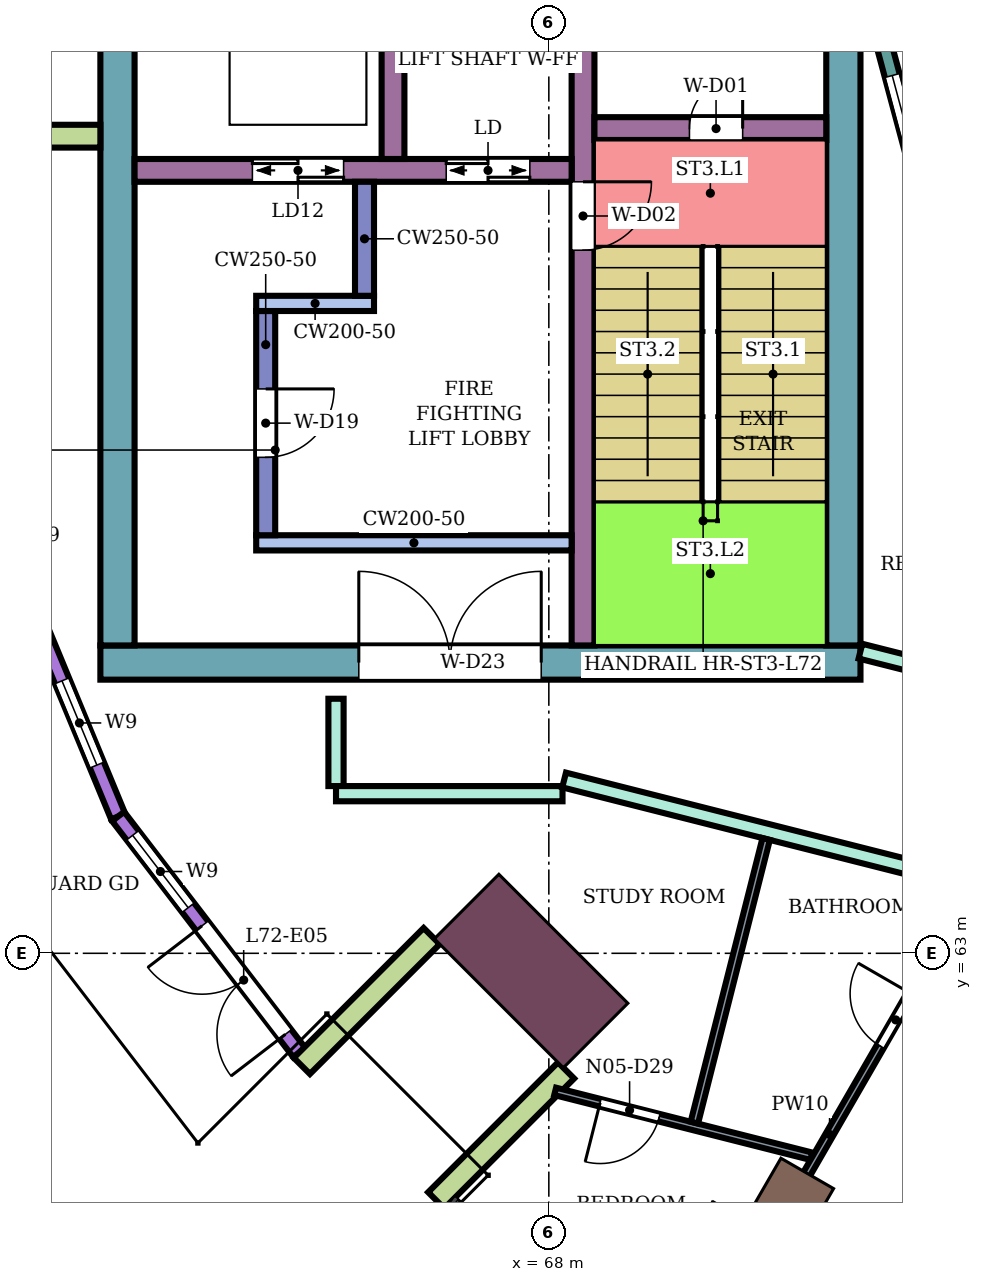
"""IFC4 building model, lengths in metres.
Left out: names, types, materials, properties, quantities, classifications, styles, units other than length and angle.
Written with IfcOpenShell. Run it as: python <this file> out.ifc"""

import sys

from ifc_helpers import new_model, si_unit, direction, frame, frame_2d, origin, origin_2d, place, context, subcontext, project, spatial, rectangle, extrude, element, fill, save


model = new_model("IFC4")
c1 = context("Model", 3, precision=1e-05, world=origin(), true_north=direction((0.0, 1.0)))
c2 = subcontext(c1, "Body", "Model", "MODEL_VIEW")
j1 = project(units=[si_unit("LENGTHUNIT", "METRE"), si_unit("PLANEANGLEUNIT", "RADIAN")], contexts=[c1])
p1 = place(None, origin())
s1 = spatial("IfcSite", under=j1, at=p1, CompositionType="ELEMENT")
p2 = place(p1, origin())
s2 = spatial("IfcBuilding", under=s1, at=p2, CompositionType="ELEMENT")
p3 = place(p2, frame((0.0, 0.0, 314.9)))
s3 = spatial("IfcBuildingStorey", under=s2, at=p3, CompositionType="ELEMENT", Elevation=314.9)
p4 = place(p3, frame((71.2, 59.758, 0.0), z_axis=(0.0, 0.0, 1.0), x_axis=(-0.5, -0.866025403784, 0.0)))
e1 = element("IfcColumn", 1, at=p4, inside=s3, PredefinedType="COLUMN", context=c2, shape_type="SweptSolid", body=[
    extrude(rectangle(XDim=0.8, YDim=0.8, at=origin_2d()), origin(), (0.0, 0.0, 1.0), 4.4),
])
p5 = place(p3, frame((67.767, 62.767, 0.0), z_axis=(0.0, 0.0, 1.0), x_axis=(-0.707106781187, -0.707106781187, 0.0)))
e2 = element("IfcColumn", 2, at=p5, inside=s3, PredefinedType="COLUMN", context=c2, shape_type="SweptSolid", body=[
    extrude(rectangle(XDim=1.2, YDim=2.4, at=origin_2d()), origin(), (0.0, 0.0, 1.0), 4.4),
])
p6 = place(p3, frame((72.1, 66.825, 0.0), z_axis=(0.0, 0.0, 1.0), x_axis=(-1.0, 0.0, 0.0)))
e3 = element("IfcWall", 3, at=p6, inside=s3, PredefinedType="SHEAR", context=c2, shape_type="SweptSolid", body=[
    extrude(rectangle(XDim=10.0, YDim=0.45, at=frame_2d((5.0, 0.0))), origin(), (0.0, 0.0, 1.0), 4.08),
])
p7 = place(p6, frame((4.2, 0.0, 0.0)))
e4 = element("IfcOpeningElement", 4, at=p7, cuts=e3, PredefinedType="OPENING", context=c2, shape_type="SweptSolid", body=[
    extrude(rectangle(XDim=2.4, YDim=2.4, at=frame_2d((1.2, 1.2))), frame((0.0, 0.235, 0.0), z_axis=(0.0, -1.0, 0.0), x_axis=(1.0, 0.0, 0.0)), (0.0, 0.0, 1.0), 0.47),
])
p8 = place(p3, frame((71.875, 75.0, 0.0), z_axis=(0.0, 0.0, 1.0), x_axis=(0.0, -1.0, 0.0)))
e5 = element("IfcWall", 5, at=p8, inside=s3, PredefinedType="SHEAR", context=c2, shape_type="SweptSolid", body=[
    extrude(rectangle(XDim=7.95, YDim=0.45, at=frame_2d((3.975, 0.0))), origin(), (0.0, 0.0, 1.0), 4.08),
])
p9 = place(p3, frame((62.325, 76.4, 0.0), z_axis=(0.0, 0.0, 1.0), x_axis=(0.0, -1.0, 0.0)))
e6 = element("IfcWall", 6, at=p9, inside=s3, PredefinedType="SHEAR", context=c2, shape_type="SweptSolid", body=[
    extrude(rectangle(XDim=9.35, YDim=0.45, at=frame_2d((4.675, 0.0))), origin(), (0.0, 0.0, 1.0), 4.08),
])
p10 = place(p3, frame((68.45, 75.0, 0.0), z_axis=(0.0, 0.0, 1.0), x_axis=(0.0, -1.0, 0.0)))
e7 = element("IfcWall", 7, at=p10, inside=s3, PredefinedType="SHEAR", context=c2, shape_type="SweptSolid", body=[
    extrude(rectangle(XDim=7.95, YDim=0.3, at=frame_2d((3.975, 0.0))), origin(), (0.0, 0.0, 1.0), 4.08),
])
p11 = place(p10, frame((1.85, 0.0, 0.0)))
e8 = element("IfcOpeningElement", 8, at=p11, cuts=e7, PredefinedType="OPENING", context=c2, shape_type="SweptSolid", body=[
    extrude(rectangle(XDim=0.9, YDim=2.1, at=frame_2d((0.45, 1.05))), frame((0.0, 0.16, 0.0), z_axis=(0.0, -1.0, 0.0), x_axis=(1.0, 0.0, 0.0)), (0.0, 0.0, 1.0), 0.32),
])
p12 = place(p3, frame((71.65, 73.85, 0.0), z_axis=(0.0, 0.0, 1.0), x_axis=(-1.0, 0.0, 0.0)))
e9 = element("IfcWall", 9, at=p12, inside=s3, PredefinedType="SHEAR", context=c2, shape_type="SweptSolid", body=[
    extrude(rectangle(XDim=3.05, YDim=0.3, at=frame_2d((1.525, 0.0))), origin(), (0.0, 0.0, 1.0), 4.08),
])
p13 = place(p12, frame((1.1, 0.0, 0.0)))
e10 = element("IfcOpeningElement", 10, at=p13, cuts=e9, PredefinedType="OPENING", context=c2, shape_type="SweptSolid", body=[
    extrude(rectangle(XDim=0.7, YDim=2.0, at=frame_2d((0.35, 1.0))), frame((0.0, 0.16, 0.0), z_axis=(0.0, -1.0, 0.0), x_axis=(1.0, 0.0, 0.0)), (0.0, 0.0, 1.0), 0.32),
])
p14 = place(p3, frame((68.3, 73.3, 0.0), z_axis=(0.0, 0.0, 1.0), x_axis=(-1.0, 0.0, 0.0)))
e11 = element("IfcWall", 11, at=p14, inside=s3, PredefinedType="SHEAR", context=c2, shape_type="SweptSolid", body=[
    extrude(rectangle(XDim=5.75, YDim=0.3, at=frame_2d((2.875, 0.0))), origin(), (0.0, 0.0, 1.0), 4.08),
])
p15 = place(p14, frame((0.55, 0.0, 0.0)))
e12 = element("IfcOpeningElement", 12, at=p15, cuts=e11, PredefinedType="OPENING", context=c2, shape_type="SweptSolid", body=[
    extrude(rectangle(XDim=1.1, YDim=2.1, at=frame_2d((0.55, 1.05))), frame((0.0, 0.16, 0.0), z_axis=(0.0, -1.0, 0.0), x_axis=(1.0, 0.0, 0.0)), (0.0, 0.0, 1.0), 0.32),
])
p16 = place(p14, frame((3.0, 0.0, 0.0)))
e13 = element("IfcOpeningElement", 13, at=p16, cuts=e11, PredefinedType="OPENING", context=c2, shape_type="SweptSolid", body=[
    extrude(rectangle(XDim=1.2, YDim=2.1, at=frame_2d((0.6, 1.05))), frame((0.0, 0.16, 0.0), z_axis=(0.0, -1.0, 0.0), x_axis=(1.0, 0.0, 0.0)), (0.0, 0.0, 1.0), 0.32),
])
p17 = place(p3, frame((65.95, 76.0, 0.0), z_axis=(0.0, 0.0, 1.0), x_axis=(0.0, -1.0, 0.0)))
e14 = element("IfcWall", 14, at=p17, inside=s3, PredefinedType="SHEAR", context=c2, shape_type="SweptSolid", body=[
    extrude(rectangle(XDim=2.55, YDim=0.3, at=frame_2d((1.275, 0.0))), origin(), (0.0, 0.0, 1.0), 4.08),
])
p18 = place(p3, frame((68.3, 68.4, 0.0), z_axis=(0.0, 0.0, 1.0), x_axis=(-1.0, 0.0, 0.0)))
e15 = element("IfcWall", 15, at=p18, inside=s3, PredefinedType="SHEAR", context=c2, shape_type="SweptSolid", body=[
    extrude(rectangle(XDim=4.15, YDim=0.2, at=frame_2d((2.075, 0.0))), origin(), (0.0, 0.0, 1.0), 4.08),
])
p19 = place(p3, frame((64.275, 71.45, 0.0), z_axis=(0.0, 0.0, 1.0), x_axis=(0.0, -1.0, 0.0)))
e16 = element("IfcWall", 16, at=p19, inside=s3, PredefinedType="SHEAR", context=c2, shape_type="SweptSolid", body=[
    extrude(rectangle(XDim=2.95, YDim=0.25, at=frame_2d((1.475, 0.0))), origin(), (0.0, 0.0, 1.0), 4.08),
])
p20 = place(p19, frame((1.025, 0.0, 0.0)))
e17 = element("IfcOpeningElement", 17, at=p20, cuts=e16, PredefinedType="OPENING", context=c2, shape_type="SweptSolid", body=[
    extrude(rectangle(XDim=0.9, YDim=2.1, at=frame_2d((0.45, 1.05))), frame((0.0, 0.135, 0.0), z_axis=(0.0, -1.0, 0.0), x_axis=(1.0, 0.0, 0.0)), (0.0, 0.0, 1.0), 0.27),
])
p21 = place(p3, frame((65.7, 71.55, 0.0), z_axis=(0.0, 0.0, 1.0), x_axis=(-1.0, 0.0, 0.0)))
e18 = element("IfcWall", 18, at=p21, inside=s3, PredefinedType="SHEAR", context=c2, shape_type="SweptSolid", body=[
    extrude(rectangle(XDim=1.55, YDim=0.2, at=frame_2d((0.775, 0.0))), origin(), (0.0, 0.0, 1.0), 4.08),
])
p22 = place(p3, frame((65.575, 73.15, 0.0), z_axis=(0.0, 0.0, 1.0), x_axis=(0.0, -1.0, 0.0)))
e19 = element("IfcWall", 19, at=p22, inside=s3, PredefinedType="SHEAR", context=c2, shape_type="SweptSolid", body=[
    extrude(rectangle(XDim=1.5, YDim=0.25, at=frame_2d((0.75, 0.0))), origin(), (0.0, 0.0, 1.0), 4.08),
])
p23 = place(p3, frame((60.296, 69.72, 0.0), z_axis=(0.0, 0.0, 1.0), x_axis=(0.382690574388, -0.923876574156, 0.0)))
e20 = element("IfcWall", 20, at=p23, inside=s3, PredefinedType="NOTDEFINED", context=c2, shape_type="SweptSolid", body=[
    extrude(rectangle(XDim=5.325, YDim=0.2, at=frame_2d((2.663, 0.0))), origin(), (0.0, 0.0, 1.0), 4.4),
])
p24 = place(p23, frame((0.731, 0.0, 0.9)))
e21 = element("IfcOpeningElement", 21, at=p24, cuts=e20, PredefinedType="OPENING", context=c2, shape_type="SweptSolid", body=[
    extrude(rectangle(XDim=1.2, YDim=2.7, at=frame_2d((0.6, 1.35))), frame((0.0, 0.11, 0.0), z_axis=(0.0, -1.0, 0.0), x_axis=(1.0, 0.0, 0.0)), (0.0, 0.0, 1.0), 0.22),
])
p25 = place(p23, frame((3.394, 0.0, 0.9)))
e22 = element("IfcOpeningElement", 22, at=p25, cuts=e20, PredefinedType="OPENING", context=c2, shape_type="SweptSolid", body=[
    extrude(rectangle(XDim=1.2, YDim=2.7, at=frame_2d((0.6, 1.35))), frame((0.0, 0.11, 0.0), z_axis=(0.0, -1.0, 0.0), x_axis=(1.0, 0.0, 0.0)), (0.0, 0.0, 1.0), 0.22),
])
p26 = place(p3, frame((62.334, 64.801, 0.0), z_axis=(0.0, 0.0, 1.0), x_axis=(0.608757608177, -0.793356272104, 0.0)))
e23 = element("IfcWall", 23, at=p26, inside=s3, PredefinedType="NOTDEFINED", context=c2, shape_type="SweptSolid", body=[
    extrude(rectangle(XDim=3.913, YDim=0.2, at=frame_2d((1.957, 0.0))), origin(), (0.0, 0.0, 1.0), 4.4),
])
p27 = place(p26, frame((0.313, 0.0, 0.9)))
e24 = element("IfcOpeningElement", 24, at=p27, cuts=e23, PredefinedType="OPENING", context=c2, shape_type="SweptSolid", body=[
    extrude(rectangle(XDim=1.2, YDim=2.7, at=frame_2d((0.6, 1.35))), frame((0.0, 0.11, 0.0), z_axis=(0.0, -1.0, 0.0), x_axis=(1.0, 0.0, 0.0)), (0.0, 0.0, 1.0), 0.22),
])
p28 = place(p26, frame((1.813, 0.0, 0.0)))
e25 = element("IfcOpeningElement", 25, at=p28, cuts=e23, PredefinedType="OPENING", context=c2, shape_type="SweptSolid", body=[
    extrude(rectangle(XDim=1.8, YDim=2.7, at=frame_2d((0.9, 1.35))), frame((0.0, 0.11, 0.0), z_axis=(0.0, -1.0, 0.0), x_axis=(1.0, 0.0, 0.0)), (0.0, 0.0, 1.0), 0.22),
])
for number, where, z_axis, x_axis in (
    (26, (62.1, 73.75, 0.0), (0.0, 0.0, 1.0), (-1.0, 0.0, 0.0)),
    (27, (66.459, 63.227, 0.0), (0.0, 0.0, 1.0), (-0.707, -0.707, 0.0)),
    (28, (68.227, 61.459, 0.0), (0.0, 0.0, 1.0), (-0.707, -0.707, 0.0)),
):
    element("IfcWall", number, at=place(p3, frame(where, z_axis=z_axis, x_axis=x_axis)), inside=s3, PredefinedType="NOTDEFINED", context=c2, shape_type="SweptSolid", body=[
        extrude(rectangle(XDim=2.416, YDim=0.3, at=frame_2d((1.208, 0.0))), origin(), (0.0, 0.0, 1.0), 4.4),
    ])
p29 = place(p3, frame((72.396, 75.0, 0.0), z_axis=(0.0, 0.0, 1.0), x_axis=(0.258789828301, -0.965933654434, 0.0)))
e29 = element("IfcWall", 29, at=p29, inside=s3, PredefinedType="NOTDEFINED", context=c2, shape_type="SweptSolid", body=[
    extrude(rectangle(XDim=3.936, YDim=0.2, at=frame_2d((1.968, 0.0))), origin(), (0.0, 0.0, 1.0), 4.4),
])
p30 = place(p29, frame((0.468, 0.0, 0.9)))
e30 = element("IfcOpeningElement", 30, at=p30, cuts=e29, PredefinedType="OPENING", context=c2, shape_type="SweptSolid", body=[
    extrude(rectangle(XDim=3.0, YDim=2.3, at=frame_2d((1.5, 1.15))), frame((0.0, 0.11, 0.0), z_axis=(0.0, -1.0, 0.0), x_axis=(1.0, 0.0, 0.0)), (0.0, 0.0, 1.0), 0.22),
])
p31 = place(p3, frame((65.2, 65.2, 0.0), z_axis=(0.0, 0.0, 1.0), x_axis=(0.0, 1.0, 0.0)))
e31 = element("IfcWall", 31, at=p31, inside=s3, PredefinedType="PARTITIONING", context=c2, shape_type="SweptSolid", body=[
    extrude(rectangle(XDim=1.149, YDim=0.2, at=frame_2d((0.575, 0.0))), origin(), (0.0, 0.0, 1.0), 3.95),
])
p32 = place(p3, frame((65.2, 65.1, 0.0), z_axis=(0.0, 0.0, 1.0), x_axis=(1.0, 0.0, 0.0)))
e32 = element("IfcWall", 32, at=p32, inside=s3, PredefinedType="PARTITIONING", context=c2, shape_type="SweptSolid", body=[
    extrude(rectangle(XDim=2.98, YDim=0.2, at=frame_2d((1.49, 0.0))), origin(), (0.0, 0.0, 1.0), 3.95),
])
p33 = place(p3, frame((68.201, 65.28, 0.0), z_axis=(0.0, 0.0, 1.0), x_axis=(0.969421088032, -0.245403247897, 0.0)))
e33 = element("IfcWall", 33, at=p33, inside=s3, PredefinedType="PARTITIONING", context=c2, shape_type="SweptSolid", body=[
    extrude(rectangle(XDim=5.927, YDim=0.2, at=frame_2d((2.964, 0.0))), origin(), (0.0, 0.0, 1.0), 3.95),
])
p34 = place(p3, frame((72.1, 66.975, 0.0), z_axis=(0.0, 0.0, 1.0), x_axis=(0.969471314457, -0.245204752086, 0.0)))
e34 = element("IfcWall", 34, at=p34, inside=s3, PredefinedType="PARTITIONING", context=c2, shape_type="SweptSolid", body=[
    extrude(rectangle(XDim=2.582, YDim=0.2, at=frame_2d((1.291, 0.0))), origin(), (0.0, 0.0, 1.0), 3.95),
])
p35 = place(p34, frame((0.841, 0.0, 0.0)))
e35 = element("IfcOpeningElement", 35, at=p35, cuts=e34, PredefinedType="OPENING", context=c2, shape_type="SweptSolid", body=[
    extrude(rectangle(XDim=0.9, YDim=2.1, at=frame_2d((0.45, 1.05))), frame((0.0, 0.11, 0.0), z_axis=(0.0, -1.0, 0.0), x_axis=(1.0, 0.0, 0.0)), (0.0, 0.0, 1.0), 0.22),
])
p36 = place(p3, frame((68.083, 61.184, 0.0), z_axis=(0.0, 0.0, 1.0), x_axis=(0.969415105271, -0.245426880503, 0.0)))
e36 = element("IfcWall", 36, at=p36, inside=s3, PredefinedType="PARTITIONING", context=c2, shape_type="SweptSolid", body=[
    extrude(rectangle(XDim=3.476, YDim=0.1, at=frame_2d((1.738, 0.0))), origin(), (0.0, 0.0, 1.0), 3.95),
])
p37 = place(p36, frame((0.61, 0.0, 0.0)))
e37 = element("IfcOpeningElement", 37, at=p37, cuts=e36, PredefinedType="OPENING", context=c2, shape_type="SweptSolid", body=[
    extrude(rectangle(XDim=0.8, YDim=2.1, at=frame_2d((0.4, 1.05))), frame((0.0, 0.06, 0.0), z_axis=(0.0, -1.0, 0.0), x_axis=(1.0, 0.0, 0.0)), (0.0, 0.0, 1.0), 0.12),
])
p38 = place(p3, frame((69.849, 57.424, 0.0), z_axis=(0.0, 0.0, 1.0), x_axis=(0.500112137663, 0.865960651394, 0.0)))
e38 = element("IfcWall", 38, at=p38, inside=s3, PredefinedType="PARTITIONING", context=c2, shape_type="SweptSolid", body=[
    extrude(rectangle(XDim=7.375, YDim=0.1, at=frame_2d((3.688, 0.0))), origin(), (0.0, 0.0, 1.0), 3.95),
])
p39 = place(p38, frame((1.254, 0.0, 0.0)))
e39 = element("IfcOpeningElement", 39, at=p39, cuts=e38, PredefinedType="OPENING", context=c2, shape_type="SweptSolid", body=[
    extrude(rectangle(XDim=0.9, YDim=2.1, at=frame_2d((0.45, 1.05))), frame((0.0, 0.06, 0.0), z_axis=(0.0, -1.0, 0.0), x_axis=(1.0, 0.0, 0.0)), (0.0, 0.0, 1.0), 0.12),
])
p40 = place(p38, frame((5.027, 0.0, 0.0)))
e40 = element("IfcOpeningElement", 40, at=p40, cuts=e38, PredefinedType="OPENING", context=c2, shape_type="SweptSolid", body=[
    extrude(rectangle(XDim=0.8, YDim=2.1, at=frame_2d((0.4, 1.05))), frame((0.0, 0.06, 0.0), z_axis=(0.0, -1.0, 0.0), x_axis=(1.0, 0.0, 0.0)), (0.0, 0.0, 1.0), 0.12),
])
p41 = place(p3, frame((69.914, 60.772, 0.0), z_axis=(0.0, 0.0, 1.0), x_axis=(0.245489008107, 0.969399374303, 0.0)))
e41 = element("IfcWall", 41, at=p41, inside=s3, PredefinedType="PARTITIONING", context=c2, shape_type="SweptSolid", body=[
    extrude(rectangle(XDim=3.85, YDim=0.1, at=frame_2d((1.925, 0.0))), origin(), (0.0, 0.0, 1.0), 3.95),
])
p42 = place(p25, origin())
e42 = element("IfcWindow", 42, at=p42, inside=s3, PartitioningType="SINGLE_PANEL", PredefinedType="WINDOW", context=c2, shape_type="SweptSolid", body=[
    extrude(rectangle(XDim=1.2, YDim=2.7, at=frame_2d((0.6, 1.35))), frame((0.0, 0.03, 0.0), z_axis=(0.0, -1.0, 0.0), x_axis=(1.0, 0.0, 0.0)), (0.0, 0.0, 1.0), 0.06),
])
fill(e22, e42)
p43 = place(p27, origin())
e43 = element("IfcWindow", 43, at=p43, inside=s3, PartitioningType="SINGLE_PANEL", PredefinedType="WINDOW", context=c2, shape_type="SweptSolid", body=[
    extrude(rectangle(XDim=1.2, YDim=2.7, at=frame_2d((0.6, 1.35))), frame((0.0, 0.03, 0.0), z_axis=(0.0, -1.0, 0.0), x_axis=(1.0, 0.0, 0.0)), (0.0, 0.0, 1.0), 0.06),
])
fill(e24, e43)
p44 = place(p28, frame((1.8, 0.0, 0.0), z_axis=(0.0, 0.0, 1.0), x_axis=(-1.0, 0.0, 0.0)))
e44 = element("IfcDoor", 44, at=p44, inside=s3, OperationType="DOUBLE_DOOR_SINGLE_SWING", PredefinedType="DOOR", context=c2, shape_type="SweptSolid", body=[
    extrude(rectangle(XDim=1.8, YDim=2.7, at=frame_2d((0.9, 1.35))), frame((0.0, 0.025, 0.0), z_axis=(0.0, -1.0, 0.0), x_axis=(1.0, 0.0, 0.0)), (0.0, 0.0, 1.0), 0.05),
])
fill(e25, e44)
p45 = place(p30, origin())
e45 = element("IfcWindow", 45, at=p45, inside=s3, PartitioningType="SINGLE_PANEL", PredefinedType="WINDOW", context=c2, shape_type="SweptSolid", body=[
    extrude(rectangle(XDim=3.0, YDim=2.3, at=frame_2d((1.5, 1.15))), frame((0.0, 0.03, 0.0), z_axis=(0.0, -1.0, 0.0), x_axis=(1.0, 0.0, 0.0)), (0.0, 0.0, 1.0), 0.06),
])
fill(e30, e45)
p46 = place(p37, frame((0.8, 0.0, 0.0), z_axis=(0.0, 0.0, 1.0), x_axis=(-1.0, 0.0, 0.0)))
e46 = element("IfcDoor", 46, at=p46, inside=s3, OperationType="SINGLE_SWING_RIGHT", PredefinedType="DOOR", context=c2, shape_type="SweptSolid", body=[
    extrude(rectangle(XDim=0.8, YDim=2.1, at=frame_2d((0.4, 1.05))), frame((0.0, 0.025, 0.0), z_axis=(0.0, -1.0, 0.0), x_axis=(1.0, 0.0, 0.0)), (0.0, 0.0, 1.0), 0.05),
])
fill(e37, e46)
p47 = place(p40, origin())
e47 = element("IfcDoor", 47, at=p47, inside=s3, OperationType="SINGLE_SWING_RIGHT", PredefinedType="DOOR", context=c2, shape_type="SweptSolid", body=[
    extrude(rectangle(XDim=0.8, YDim=2.1, at=frame_2d((0.4, 1.05))), frame((0.0, 0.025, 0.0), z_axis=(0.0, -1.0, 0.0), x_axis=(1.0, 0.0, 0.0)), (0.0, 0.0, 1.0), 0.05),
])
fill(e40, e47)
p48 = place(p13, frame((0.7, 0.0, 0.0), z_axis=(0.0, 0.0, 1.0), x_axis=(-1.0, 0.0, 0.0)))
e48 = element("IfcDoor", 48, at=p48, inside=s3, OperationType="SINGLE_SWING_RIGHT", PredefinedType="DOOR", context=c2, shape_type="SweptSolid", body=[
    extrude(rectangle(XDim=0.7, YDim=2.0, at=frame_2d((0.35, 1.0))), frame((0.0, 0.025, 0.0), z_axis=(0.0, -1.0, 0.0), x_axis=(1.0, 0.0, 0.0)), (0.0, 0.0, 1.0), 0.05),
])
fill(e10, e48)
p49 = place(p11, origin())
e49 = element("IfcDoor", 49, at=p49, inside=s3, OperationType="SINGLE_SWING_LEFT", PredefinedType="DOOR", context=c2, shape_type="SweptSolid", body=[
    extrude(rectangle(XDim=0.9, YDim=2.1, at=frame_2d((0.45, 1.05))), frame((0.0, 0.025, 0.0), z_axis=(0.0, -1.0, 0.0), x_axis=(1.0, 0.0, 0.0)), (0.0, 0.0, 1.0), 0.05),
])
fill(e8, e49)
p50 = place(p15, origin())
e50 = element("IfcDoor", 50, at=p50, inside=s3, OperationType="DOUBLE_DOOR_SLIDING", PredefinedType="DOOR", context=c2, shape_type="SweptSolid", body=[
    extrude(rectangle(XDim=1.1, YDim=2.1, at=frame_2d((0.55, 1.05))), frame((0.0, 0.025, 0.0), z_axis=(0.0, -1.0, 0.0), x_axis=(1.0, 0.0, 0.0)), (0.0, 0.0, 1.0), 0.05),
])
fill(e12, e50)
p51 = place(p16, origin())
e51 = element("IfcDoor", 51, at=p51, inside=s3, OperationType="DOUBLE_DOOR_SLIDING", PredefinedType="DOOR", context=c2, shape_type="SweptSolid", body=[
    extrude(rectangle(XDim=1.2, YDim=2.1, at=frame_2d((0.6, 1.05))), frame((0.0, 0.025, 0.0), z_axis=(0.0, -1.0, 0.0), x_axis=(1.0, 0.0, 0.0)), (0.0, 0.0, 1.0), 0.05),
])
fill(e13, e51)
p52 = place(p20, origin())
e52 = element("IfcDoor", 52, at=p52, inside=s3, OperationType="SINGLE_SWING_LEFT", PredefinedType="DOOR", context=c2, shape_type="SweptSolid", body=[
    extrude(rectangle(XDim=0.9, YDim=2.1, at=frame_2d((0.45, 1.05))), frame((0.0, 0.025, 0.0), z_axis=(0.0, -1.0, 0.0), x_axis=(1.0, 0.0, 0.0)), (0.0, 0.0, 1.0), 0.05),
])
fill(e17, e52)
p53 = place(p7, frame((2.4, 0.0, 0.0), z_axis=(0.0, 0.0, 1.0), x_axis=(-1.0, 0.0, 0.0)))
e53 = element("IfcDoor", 53, at=p53, inside=s3, OperationType="DOUBLE_DOOR_SINGLE_SWING", PredefinedType="DOOR", context=c2, shape_type="SweptSolid", body=[
    extrude(rectangle(XDim=2.4, YDim=2.4, at=frame_2d((1.2, 1.2))), frame((0.0, 0.025, 0.0), z_axis=(0.0, -1.0, 0.0), x_axis=(1.0, 0.0, 0.0)), (0.0, 0.0, 1.0), 0.05),
])
fill(e4, e53)
save(model, sys.argv[1])
